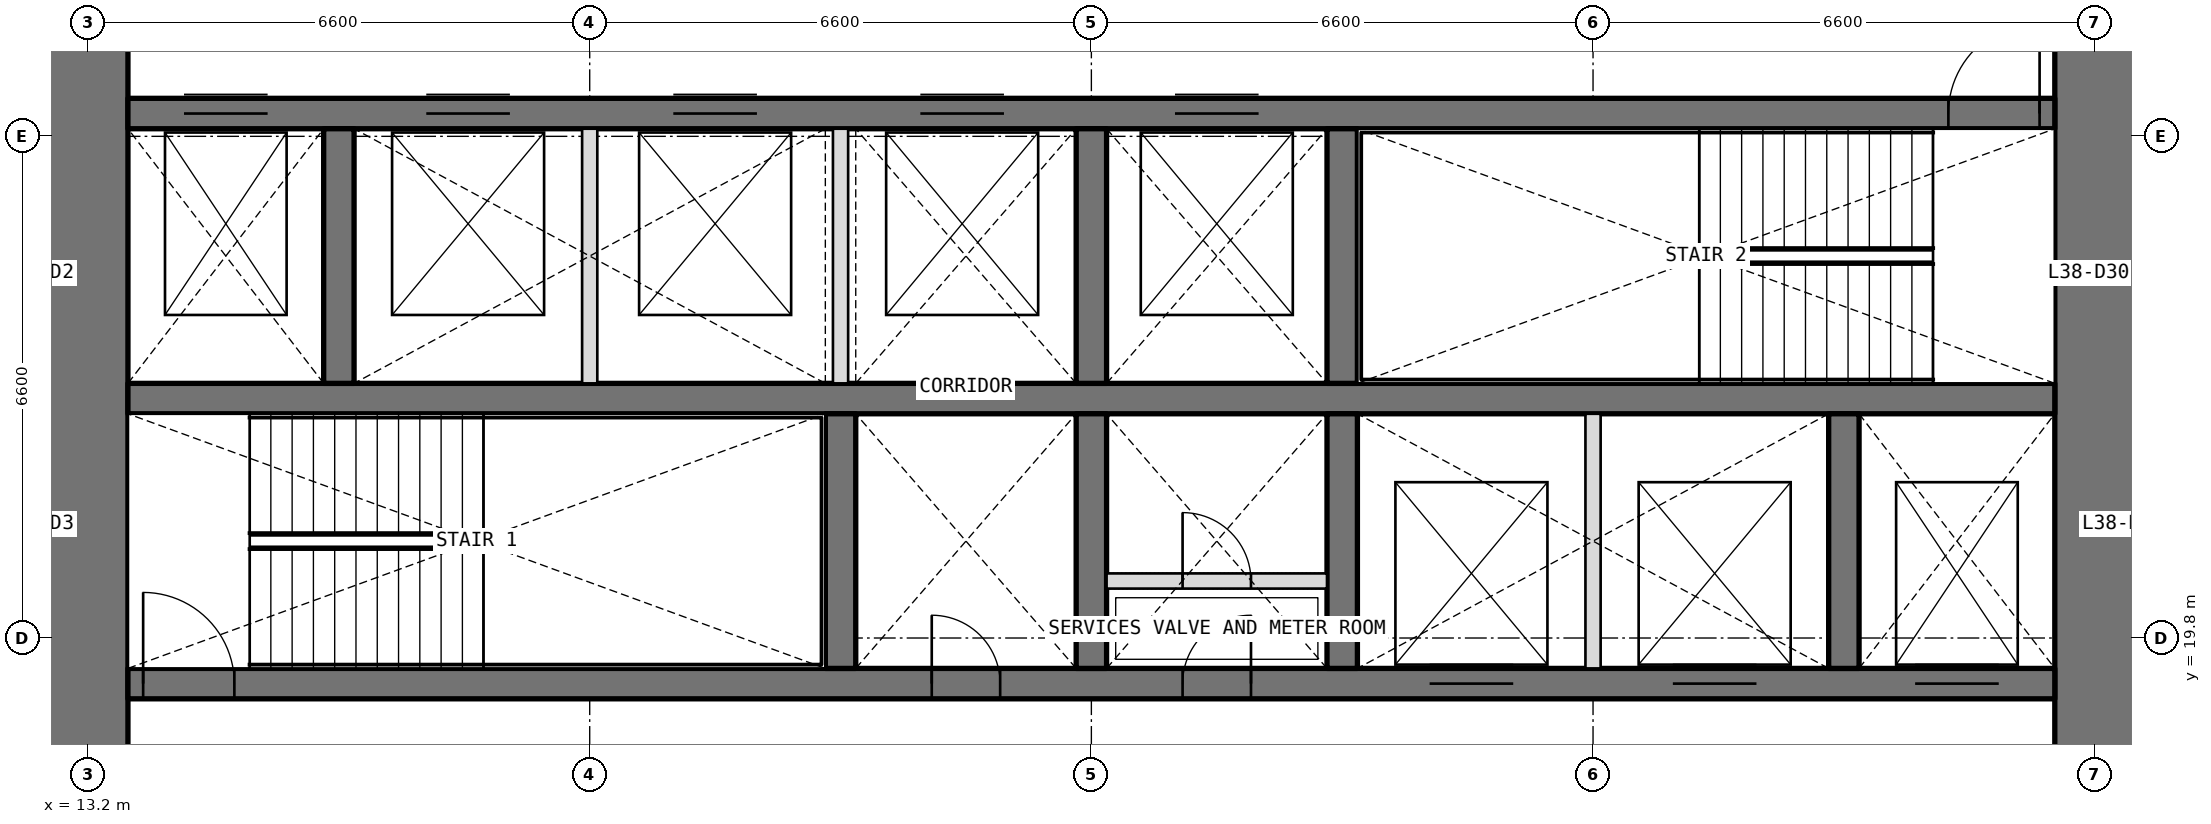
"""IFC4 building model, lengths in metres.
Left out: names, types, materials, properties, quantities, classifications, styles, units other than length and angle.
Written with IfcOpenShell. Run it as: python <this file> out.ifc"""

import sys

from ifc_helpers import new_model, si_unit, direction, frame, frame_2d, origin, place, context, subcontext, project, spatial, rectangle, extrude, element, fill, save


model = new_model("IFC4")
c1 = context("Model", 3, precision=1e-05, world=origin(), true_north=direction((0.0, 1.0)))
c2 = subcontext(c1, "Body", "Model", "MODEL_VIEW")
j1 = project(units=[si_unit("LENGTHUNIT", "METRE"), si_unit("PLANEANGLEUNIT", "RADIAN")], contexts=[c1])
p1 = place(None, origin())
s1 = spatial("IfcSite", under=j1, at=p1, CompositionType="ELEMENT")
p2 = place(p1, origin())
s2 = spatial("IfcBuilding", under=s1, at=p2, CompositionType="ELEMENT")
p3 = place(p2, frame((0.0, 0.0, 168.3)))
s3 = spatial("IfcBuildingStorey", under=s2, at=p3, CompositionType="ELEMENT", Elevation=168.3)
p4 = place(p3, frame((39.6, 13.725, 0.0), z_axis=(0.0, 0.0, 1.0), x_axis=(0.0, 1.0, 0.0)))
e1 = element("IfcWall", 1, at=p4, inside=s3, PredefinedType="SHEAR", context=c2, shape_type="SweptSolid", body=[
    extrude(rectangle(XDim=18.75, YDim=1.05, at=frame_2d((9.375, 0.0))), origin(), (0.0, 0.0, 1.0), 4.2),
])
p5 = place(p4, frame((3.025, 0.0, 0.0)))
e2 = element("IfcOpeningElement", 2, at=p5, cuts=e1, PredefinedType="OPENING", context=c2, shape_type="SweptSolid", body=[
    extrude(rectangle(XDim=1.6, YDim=2.1, at=frame_2d((0.8, 1.05))), frame((0.0, 0.535, 0.0), z_axis=(0.0, -1.0, 0.0), x_axis=(1.0, 0.0, 0.0)), (0.0, 0.0, 1.0), 1.07),
])
p6 = place(p4, frame((13.825, 0.0, 0.0)))
e3 = element("IfcOpeningElement", 3, at=p6, cuts=e1, PredefinedType="OPENING", context=c2, shape_type="SweptSolid", body=[
    extrude(rectangle(XDim=1.6, YDim=2.1, at=frame_2d((0.8, 1.05))), frame((0.0, 0.535, 0.0), z_axis=(0.0, -1.0, 0.0), x_axis=(1.0, 0.0, 0.0)), (0.0, 0.0, 1.0), 1.07),
])
p7 = place(p3, frame((13.2, 32.475, 0.0), z_axis=(0.0, 0.0, 1.0), x_axis=(0.0, -1.0, 0.0)))
e4 = element("IfcWall", 4, at=p7, inside=s3, PredefinedType="SHEAR", context=c2, shape_type="SweptSolid", body=[
    extrude(rectangle(XDim=18.75, YDim=1.05, at=frame_2d((9.375, 0.0))), origin(), (0.0, 0.0, 1.0), 4.2),
])
p8 = place(p7, frame((14.125, 0.0, 0.0)))
e5 = element("IfcOpeningElement", 5, at=p8, cuts=e4, PredefinedType="OPENING", context=c2, shape_type="SweptSolid", body=[
    extrude(rectangle(XDim=1.6, YDim=2.1, at=frame_2d((0.8, 1.05))), frame((0.0, 0.535, 0.0), z_axis=(0.0, -1.0, 0.0), x_axis=(1.0, 0.0, 0.0)), (0.0, 0.0, 1.0), 1.07),
])
p9 = place(p7, frame((3.325, 0.0, 0.0)))
e6 = element("IfcOpeningElement", 6, at=p9, cuts=e4, PredefinedType="OPENING", context=c2, shape_type="SweptSolid", body=[
    extrude(rectangle(XDim=1.6, YDim=2.1, at=frame_2d((0.8, 1.05))), frame((0.0, 0.535, 0.0), z_axis=(0.0, -1.0, 0.0), x_axis=(1.0, 0.0, 0.0)), (0.0, 0.0, 1.0), 1.07),
])
p10 = place(p3, frame((13.725, 19.2, 0.0), z_axis=(0.0, 0.0, 1.0), x_axis=(1.0, 0.0, 0.0)))
e7 = element("IfcWall", 7, at=p10, inside=s3, PredefinedType="SHEAR", context=c2, shape_type="SweptSolid", body=[
    extrude(rectangle(XDim=25.35, YDim=0.4, at=frame_2d((12.675, 0.0))), origin(), (0.0, 0.0, 1.0), 4.2),
])
p11 = place(p10, frame((10.575, 0.0, 0.0)))
e8 = element("IfcOpeningElement", 8, at=p11, cuts=e7, PredefinedType="OPENING", context=c2, shape_type="SweptSolid", body=[
    extrude(rectangle(XDim=0.9, YDim=2.1, at=frame_2d((0.45, 1.05))), frame((0.0, 0.21, 0.0), z_axis=(0.0, -1.0, 0.0), x_axis=(1.0, 0.0, 0.0)), (0.0, 0.0, 1.0), 0.42),
])
p12 = place(p10, frame((13.875, 0.0, 0.0)))
e9 = element("IfcOpeningElement", 9, at=p12, cuts=e7, PredefinedType="OPENING", context=c2, shape_type="SweptSolid", body=[
    extrude(rectangle(XDim=0.9, YDim=2.1, at=frame_2d((0.45, 1.05))), frame((0.0, 0.21, 0.0), z_axis=(0.0, -1.0, 0.0), x_axis=(1.0, 0.0, 0.0)), (0.0, 0.0, 1.0), 0.42),
])
p13 = place(p10, frame((0.2, 0.0, 0.0)))
e10 = element("IfcOpeningElement", 10, at=p13, cuts=e7, PredefinedType="OPENING", context=c2, shape_type="SweptSolid", body=[
    extrude(rectangle(XDim=1.2, YDim=2.1, at=frame_2d((0.6, 1.05))), frame((0.0, 0.21, 0.0), z_axis=(0.0, -1.0, 0.0), x_axis=(1.0, 0.0, 0.0)), (0.0, 0.0, 1.0), 0.42),
])
p14 = place(p10, frame((23.512, 0.0, 0.0)))
e11 = element("IfcOpeningElement", 11, at=p14, cuts=e7, PredefinedType="OPENING", context=c2, shape_type="SweptSolid", body=[
    extrude(rectangle(XDim=1.1, YDim=2.1, at=frame_2d((0.55, 1.05))), frame((0.0, 0.21, 0.0), z_axis=(0.0, -1.0, 0.0), x_axis=(1.0, 0.0, 0.0)), (0.0, 0.0, 1.0), 0.42),
])
p15 = place(p10, frame((17.125, 0.0, 0.0)))
e12 = element("IfcOpeningElement", 12, at=p15, cuts=e7, PredefinedType="OPENING", context=c2, shape_type="SweptSolid", body=[
    extrude(rectangle(XDim=1.1, YDim=2.1, at=frame_2d((0.55, 1.05))), frame((0.0, 0.21, 0.0), z_axis=(0.0, -1.0, 0.0), x_axis=(1.0, 0.0, 0.0)), (0.0, 0.0, 1.0), 0.42),
])
p16 = place(p10, frame((20.325, 0.0, 0.0)))
e13 = element("IfcOpeningElement", 13, at=p16, cuts=e7, PredefinedType="OPENING", context=c2, shape_type="SweptSolid", body=[
    extrude(rectangle(XDim=1.1, YDim=2.1, at=frame_2d((0.55, 1.05))), frame((0.0, 0.21, 0.0), z_axis=(0.0, -1.0, 0.0), x_axis=(1.0, 0.0, 0.0)), (0.0, 0.0, 1.0), 0.42),
])
p17 = place(p3, frame((13.725, 22.95, 0.0), z_axis=(0.0, 0.0, 1.0), x_axis=(1.0, 0.0, 0.0)))
e14 = element("IfcWall", 14, at=p17, inside=s3, PredefinedType="SHEAR", context=c2, shape_type="SweptSolid", body=[
    extrude(rectangle(XDim=25.35, YDim=0.4, at=frame_2d((12.675, 0.0))), origin(), (0.0, 0.0, 1.0), 4.2),
])
p18 = place(p3, frame((13.725, 26.7, 0.0), z_axis=(0.0, 0.0, 1.0), x_axis=(1.0, 0.0, 0.0)))
e15 = element("IfcWall", 15, at=p18, inside=s3, PredefinedType="SHEAR", context=c2, shape_type="SweptSolid", body=[
    extrude(rectangle(XDim=25.35, YDim=0.4, at=frame_2d((12.675, 0.0))), origin(), (0.0, 0.0, 1.0), 4.2),
])
p19 = place(p18, frame((23.95, 0.0, 0.0)))
e16 = element("IfcOpeningElement", 16, at=p19, cuts=e15, PredefinedType="OPENING", context=c2, shape_type="SweptSolid", body=[
    extrude(rectangle(XDim=1.2, YDim=2.1, at=frame_2d((0.6, 1.05))), frame((0.0, 0.21, 0.0), z_axis=(0.0, -1.0, 0.0), x_axis=(1.0, 0.0, 0.0)), (0.0, 0.0, 1.0), 0.42),
])
p20 = place(p18, frame((0.738, 0.0, 0.0)))
e17 = element("IfcOpeningElement", 17, at=p20, cuts=e15, PredefinedType="OPENING", context=c2, shape_type="SweptSolid", body=[
    extrude(rectangle(XDim=1.1, YDim=2.1, at=frame_2d((0.55, 1.05))), frame((0.0, 0.21, 0.0), z_axis=(0.0, -1.0, 0.0), x_axis=(1.0, 0.0, 0.0)), (0.0, 0.0, 1.0), 0.42),
])
p21 = place(p18, frame((3.925, 0.0, 0.0)))
e18 = element("IfcOpeningElement", 18, at=p21, cuts=e15, PredefinedType="OPENING", context=c2, shape_type="SweptSolid", body=[
    extrude(rectangle(XDim=1.1, YDim=2.1, at=frame_2d((0.55, 1.05))), frame((0.0, 0.21, 0.0), z_axis=(0.0, -1.0, 0.0), x_axis=(1.0, 0.0, 0.0)), (0.0, 0.0, 1.0), 0.42),
])
p22 = place(p18, frame((7.175, 0.0, 0.0)))
e19 = element("IfcOpeningElement", 19, at=p22, cuts=e15, PredefinedType="OPENING", context=c2, shape_type="SweptSolid", body=[
    extrude(rectangle(XDim=1.1, YDim=2.1, at=frame_2d((0.55, 1.05))), frame((0.0, 0.21, 0.0), z_axis=(0.0, -1.0, 0.0), x_axis=(1.0, 0.0, 0.0)), (0.0, 0.0, 1.0), 0.42),
])
p23 = place(p18, frame((10.425, 0.0, 0.0)))
e20 = element("IfcOpeningElement", 20, at=p23, cuts=e15, PredefinedType="OPENING", context=c2, shape_type="SweptSolid", body=[
    extrude(rectangle(XDim=1.1, YDim=2.1, at=frame_2d((0.55, 1.05))), frame((0.0, 0.21, 0.0), z_axis=(0.0, -1.0, 0.0), x_axis=(1.0, 0.0, 0.0)), (0.0, 0.0, 1.0), 0.42),
])
p24 = place(p18, frame((13.775, 0.0, 0.0)))
e21 = element("IfcOpeningElement", 21, at=p24, cuts=e15, PredefinedType="OPENING", context=c2, shape_type="SweptSolid", body=[
    extrude(rectangle(XDim=1.1, YDim=2.1, at=frame_2d((0.55, 1.05))), frame((0.0, 0.21, 0.0), z_axis=(0.0, -1.0, 0.0), x_axis=(1.0, 0.0, 0.0)), (0.0, 0.0, 1.0), 0.42),
])
for number, where, z_axis, x_axis in (
    (22, (23.1, 19.4, 0.0), (0.0, 0.0, 1.0), (0.0, 1.0, 0.0)),
    (23, (26.4, 19.4, 0.0), (0.0, 0.0, 1.0), (0.0, 1.0, 0.0)),
    (24, (29.7, 19.4, 0.0), (0.0, 0.0, 1.0), (0.0, 1.0, 0.0)),
    (25, (36.3, 19.4, 0.0), (0.0, 0.0, 1.0), (0.0, 1.0, 0.0)),
    (26, (16.5, 23.15, 0.0), (0.0, 0.0, 1.0), (0.0, 1.0, 0.0)),
    (27, (26.4, 23.15, 0.0), (0.0, 0.0, 1.0), (0.0, 1.0, 0.0)),
    (28, (29.7, 23.15, 0.0), (0.0, 0.0, 1.0), (0.0, 1.0, 0.0)),
):
    element("IfcWall", number, at=place(p3, frame(where, z_axis=z_axis, x_axis=x_axis)), inside=s3, PredefinedType="SHEAR", context=c2, shape_type="SweptSolid", body=[
        extrude(rectangle(XDim=3.35, YDim=0.4, at=frame_2d((1.675, 0.0))), origin(), (0.0, 0.0, 1.0), 4.2),
    ])
for number, where, z_axis, x_axis in (
    (29, (33.0, 19.4, 0.0), (0.0, 0.0, 1.0), (0.0, 1.0, 0.0)),
    (30, (19.8, 23.15, 0.0), (0.0, 0.0, 1.0), (0.0, 1.0, 0.0)),
    (31, (23.1, 23.15, 0.0), (0.0, 0.0, 1.0), (0.0, 1.0, 0.0)),
):
    element("IfcWall", number, at=place(p3, frame(where, z_axis=z_axis, x_axis=x_axis)), inside=s3, PredefinedType="PARTITIONING", context=c2, shape_type="SweptSolid", body=[
        extrude(rectangle(XDim=3.35, YDim=0.2, at=frame_2d((1.675, 0.0))), origin(), (0.0, 0.0, 1.0), 4.2),
    ])
p25 = place(p3, frame((26.6, 20.55, 0.0), z_axis=(0.0, 0.0, 1.0), x_axis=(1.0, 0.0, 0.0)))
e32 = element("IfcWall", 32, at=p25, inside=s3, PredefinedType="PARTITIONING", context=c2, shape_type="SweptSolid", body=[
    extrude(rectangle(XDim=2.9, YDim=0.2, at=frame_2d((1.45, 0.0))), origin(), (0.0, 0.0, 1.0), 3.9),
])
p26 = place(p25, frame((1.0, 0.0, 0.0)))
e33 = element("IfcOpeningElement", 33, at=p26, cuts=e32, PredefinedType="OPENING", context=c2, shape_type="SweptSolid", body=[
    extrude(rectangle(XDim=0.9, YDim=2.1, at=frame_2d((0.45, 1.05))), frame((0.0, 0.11, 0.0), z_axis=(0.0, -1.0, 0.0), x_axis=(1.0, 0.0, 0.0)), (0.0, 0.0, 1.0), 0.22),
])
p27 = place(p11, origin())
e34 = element("IfcDoor", 34, at=p27, inside=s3, OperationType="SINGLE_SWING_LEFT", PredefinedType="DOOR", context=c2, shape_type="SweptSolid", body=[
    extrude(rectangle(XDim=0.9, YDim=2.1, at=frame_2d((0.45, 1.05))), frame((0.0, 0.025, 0.0), z_axis=(0.0, -1.0, 0.0), x_axis=(1.0, 0.0, 0.0)), (0.0, 0.0, 1.0), 0.05),
])
fill(e8, e34)
p28 = place(p12, origin())
e35 = element("IfcDoor", 35, at=p28, inside=s3, OperationType="SINGLE_SWING_RIGHT", PredefinedType="DOOR", context=c2, shape_type="SweptSolid", body=[
    extrude(rectangle(XDim=0.9, YDim=2.1, at=frame_2d((0.45, 1.05))), frame((0.0, 0.025, 0.0), z_axis=(0.0, -1.0, 0.0), x_axis=(1.0, 0.0, 0.0)), (0.0, 0.0, 1.0), 0.05),
])
fill(e9, e35)
p29 = place(p26, origin())
e36 = element("IfcDoor", 36, at=p29, inside=s3, OperationType="SINGLE_SWING_LEFT", PredefinedType="DOOR", context=c2, shape_type="SweptSolid", body=[
    extrude(rectangle(XDim=0.9, YDim=2.1, at=frame_2d((0.45, 1.05))), frame((0.0, 0.025, 0.0), z_axis=(0.0, -1.0, 0.0), x_axis=(1.0, 0.0, 0.0)), (0.0, 0.0, 1.0), 0.05),
])
fill(e33, e36)
p30 = place(p13, origin())
e37 = element("IfcDoor", 37, at=p30, inside=s3, OperationType="SINGLE_SWING_LEFT", PredefinedType="DOOR", context=c2, shape_type="SweptSolid", body=[
    extrude(rectangle(XDim=1.2, YDim=2.1, at=frame_2d((0.6, 1.05))), frame((0.0, 0.025, 0.0), z_axis=(0.0, -1.0, 0.0), x_axis=(1.0, 0.0, 0.0)), (0.0, 0.0, 1.0), 0.05),
])
fill(e10, e37)
p31 = place(p19, origin())
e38 = element("IfcDoor", 38, at=p31, inside=s3, OperationType="SINGLE_SWING_RIGHT", PredefinedType="DOOR", context=c2, shape_type="SweptSolid", body=[
    extrude(rectangle(XDim=1.2, YDim=2.1, at=frame_2d((0.6, 1.05))), frame((0.0, 0.025, 0.0), z_axis=(0.0, -1.0, 0.0), x_axis=(1.0, 0.0, 0.0)), (0.0, 0.0, 1.0), 0.05),
])
fill(e16, e38)
p32 = place(p20, origin())
e39 = element("IfcDoor", 39, at=p32, inside=s3, OperationType="DOUBLE_DOOR_SLIDING", PredefinedType="DOOR", context=c2, shape_type="SweptSolid", body=[
    extrude(rectangle(XDim=1.1, YDim=2.1, at=frame_2d((0.55, 1.05))), frame((0.0, 0.025, 0.0), z_axis=(0.0, -1.0, 0.0), x_axis=(1.0, 0.0, 0.0)), (0.0, 0.0, 1.0), 0.05),
])
fill(e17, e39)
p33 = place(p14, origin())
e40 = element("IfcDoor", 40, at=p33, inside=s3, OperationType="DOUBLE_DOOR_SLIDING", PredefinedType="DOOR", context=c2, shape_type="SweptSolid", body=[
    extrude(rectangle(XDim=1.1, YDim=2.1, at=frame_2d((0.55, 1.05))), frame((0.0, 0.025, 0.0), z_axis=(0.0, -1.0, 0.0), x_axis=(1.0, 0.0, 0.0)), (0.0, 0.0, 1.0), 0.05),
])
fill(e11, e40)
p34 = place(p15, origin())
e41 = element("IfcDoor", 41, at=p34, inside=s3, OperationType="DOUBLE_DOOR_SLIDING", PredefinedType="DOOR", context=c2, shape_type="SweptSolid", body=[
    extrude(rectangle(XDim=1.1, YDim=2.1, at=frame_2d((0.55, 1.05))), frame((0.0, 0.025, 0.0), z_axis=(0.0, -1.0, 0.0), x_axis=(1.0, 0.0, 0.0)), (0.0, 0.0, 1.0), 0.05),
])
fill(e12, e41)
p35 = place(p16, origin())
e42 = element("IfcDoor", 42, at=p35, inside=s3, OperationType="DOUBLE_DOOR_SLIDING", PredefinedType="DOOR", context=c2, shape_type="SweptSolid", body=[
    extrude(rectangle(XDim=1.1, YDim=2.1, at=frame_2d((0.55, 1.05))), frame((0.0, 0.025, 0.0), z_axis=(0.0, -1.0, 0.0), x_axis=(1.0, 0.0, 0.0)), (0.0, 0.0, 1.0), 0.05),
])
fill(e13, e42)
p36 = place(p21, origin())
e43 = element("IfcDoor", 43, at=p36, inside=s3, OperationType="DOUBLE_DOOR_SLIDING", PredefinedType="DOOR", context=c2, shape_type="SweptSolid", body=[
    extrude(rectangle(XDim=1.1, YDim=2.1, at=frame_2d((0.55, 1.05))), frame((0.0, 0.025, 0.0), z_axis=(0.0, -1.0, 0.0), x_axis=(1.0, 0.0, 0.0)), (0.0, 0.0, 1.0), 0.05),
])
fill(e18, e43)
p37 = place(p22, origin())
e44 = element("IfcDoor", 44, at=p37, inside=s3, OperationType="DOUBLE_DOOR_SLIDING", PredefinedType="DOOR", context=c2, shape_type="SweptSolid", body=[
    extrude(rectangle(XDim=1.1, YDim=2.1, at=frame_2d((0.55, 1.05))), frame((0.0, 0.025, 0.0), z_axis=(0.0, -1.0, 0.0), x_axis=(1.0, 0.0, 0.0)), (0.0, 0.0, 1.0), 0.05),
])
fill(e19, e44)
p38 = place(p23, origin())
e45 = element("IfcDoor", 45, at=p38, inside=s3, OperationType="DOUBLE_DOOR_SLIDING", PredefinedType="DOOR", context=c2, shape_type="SweptSolid", body=[
    extrude(rectangle(XDim=1.1, YDim=2.1, at=frame_2d((0.55, 1.05))), frame((0.0, 0.025, 0.0), z_axis=(0.0, -1.0, 0.0), x_axis=(1.0, 0.0, 0.0)), (0.0, 0.0, 1.0), 0.05),
])
fill(e20, e45)
p39 = place(p24, origin())
e46 = element("IfcDoor", 46, at=p39, inside=s3, OperationType="DOUBLE_DOOR_SLIDING", PredefinedType="DOOR", context=c2, shape_type="SweptSolid", body=[
    extrude(rectangle(XDim=1.1, YDim=2.1, at=frame_2d((0.55, 1.05))), frame((0.0, 0.025, 0.0), z_axis=(0.0, -1.0, 0.0), x_axis=(1.0, 0.0, 0.0)), (0.0, 0.0, 1.0), 0.05),
])
fill(e21, e46)
save(model, sys.argv[1])
